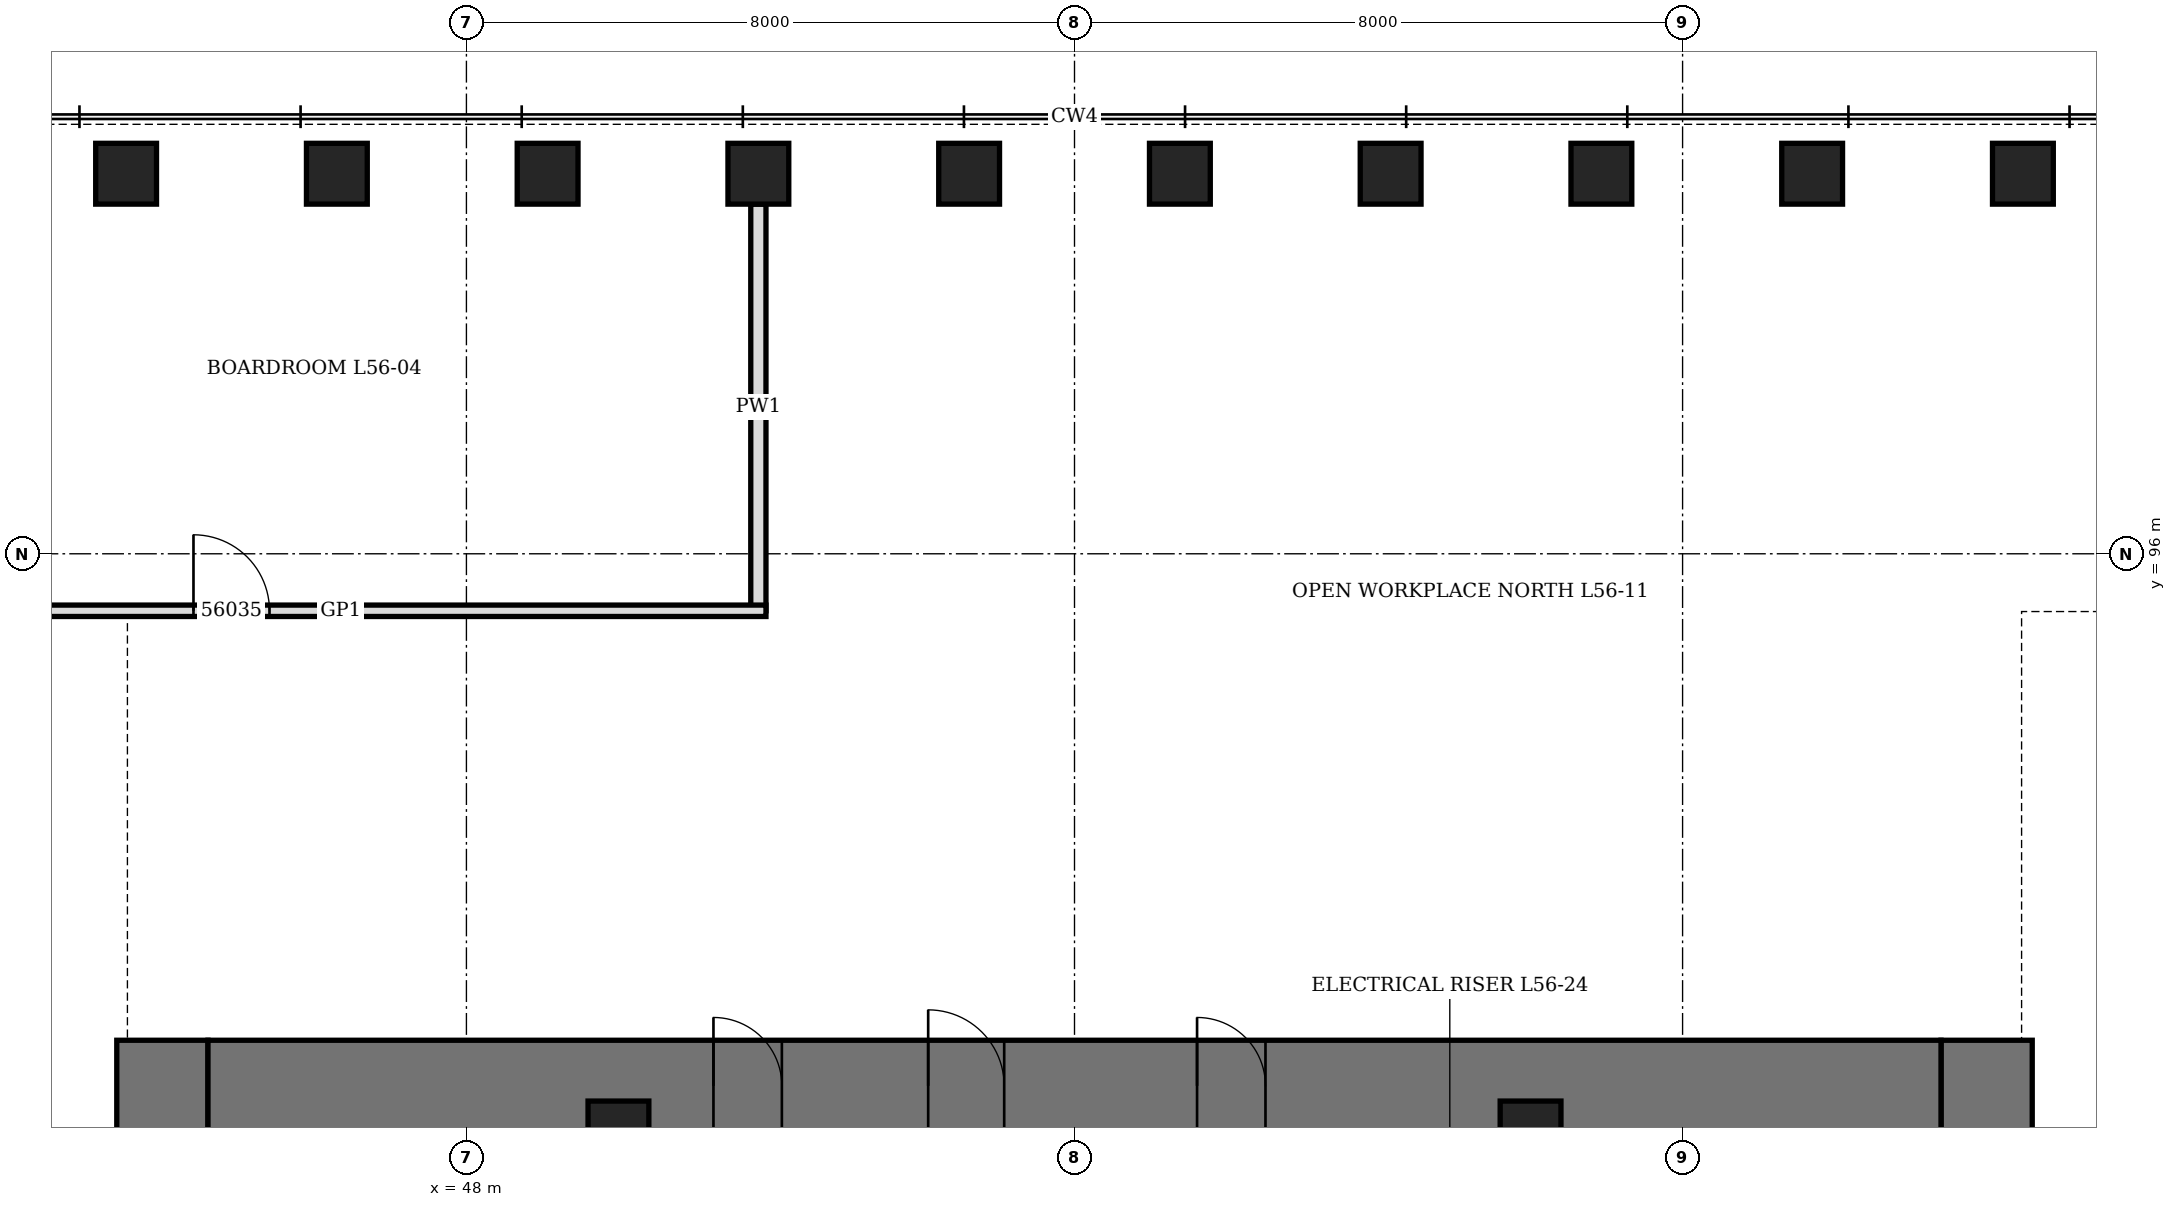
"""IFC4 building model, lengths in metres.
Left out: names, types, materials, properties, quantities, classifications, styles, units other than length and angle.
Written with IfcOpenShell. Run it as: python <this file> out.ifc"""

import sys

from ifc_helpers import new_model, si_unit, direction, frame, frame_2d, origin, origin_2d, place, context, subcontext, project, spatial, rectangle, hollow_rectangle, extrude, element, fill, save


model = new_model("IFC4")
c1 = context("Model", 3, precision=1e-05, world=origin(), true_north=direction((0.0, 1.0)))
c2 = subcontext(c1, "Body", "Model", "MODEL_VIEW")
j1 = project(units=[si_unit("LENGTHUNIT", "METRE"), si_unit("PLANEANGLEUNIT", "RADIAN")], contexts=[c1])
p1 = place(None, origin())
s1 = spatial("IfcSite", under=j1, at=p1, CompositionType="ELEMENT")
p2 = place(p1, origin())
s2 = spatial("IfcBuilding", under=s1, at=p2, CompositionType="ELEMENT")
p3 = place(p2, frame((0.0, 0.0, 250.3)))
s3 = spatial("IfcBuildingStorey", under=s2, at=p3, CompositionType="ELEMENT", Elevation=250.3)
for number, where, z_axis, x_axis in (
    (1, (68.477, 101.0, -0.16), (0.0, 0.0, 1.0), (1.0, 0.0, 0.0)),
    (2, (65.705, 101.0, -0.16), (0.0, 0.0, 1.0), (1.0, 0.0, 0.0)),
    (3, (62.932, 101.0, -0.16), (0.0, 0.0, 1.0), (1.0, 0.0, 0.0)),
    (4, (60.159, 101.0, -0.16), (0.0, 0.0, 1.0), (1.0, 0.0, 0.0)),
    (5, (57.386, 101.0, -0.16), (0.0, 0.0, 1.0), (1.0, 0.0, 0.0)),
    (6, (54.614, 101.0, -0.16), (0.0, 0.0, 1.0), (1.0, 0.0, 0.0)),
    (7, (51.841, 101.0, -0.16), (0.0, 0.0, 1.0), (1.0, 0.0, 0.0)),
    (8, (49.068, 101.0, -0.16), (0.0, 0.0, 1.0), (1.0, 0.0, 0.0)),
    (9, (46.295, 101.0, -0.16), (0.0, 0.0, 1.0), (1.0, 0.0, 0.0)),
    (10, (43.523, 101.0, -0.16), (0.0, 0.0, 1.0), (1.0, 0.0, 0.0)),
):
    element("IfcColumn", number, at=place(p3, frame(where, z_axis=z_axis, x_axis=x_axis)), inside=s3, PredefinedType="COLUMN", context=c2, shape_type="SweptSolid", body=[
        extrude(hollow_rectangle(XDim=0.8, YDim=0.8, WallThickness=0.1, at=origin_2d()), origin(), (0.0, 0.0, 1.0), 4.36),
    ])
p4 = place(p3, frame((44.0, 70.4, 0.0), z_axis=(0.0, 0.0, 1.0), x_axis=(0.0, 1.0, 0.0)))
e11 = element("IfcWall", 11, at=p4, inside=s3, PredefinedType="SHEAR", context=c2, shape_type="SweptSolid", body=[
    extrude(rectangle(XDim=19.2, YDim=1.2, at=frame_2d((9.6, 0.0))), origin(), (0.0, 0.0, 1.0), 4.2),
])
p5 = place(p4, frame((8.6, 0.0, 0.0)))
e12 = element("IfcOpeningElement", 12, at=p5, cuts=e11, PredefinedType="OPENING", context=c2, shape_type="SweptSolid", body=[
    extrude(rectangle(XDim=2.0, YDim=2.4, at=frame_2d((1.0, 1.2))), frame((0.0, 0.61, 0.0), z_axis=(0.0, -1.0, 0.0), x_axis=(1.0, 0.0, 0.0)), (0.0, 0.0, 1.0), 1.22),
])
p6 = place(p3, frame((68.0, 70.4, 0.0), z_axis=(0.0, 0.0, 1.0), x_axis=(0.0, 1.0, 0.0)))
e13 = element("IfcWall", 13, at=p6, inside=s3, PredefinedType="SHEAR", context=c2, shape_type="SweptSolid", body=[
    extrude(rectangle(XDim=19.2, YDim=1.2, at=frame_2d((9.6, 0.0))), origin(), (0.0, 0.0, 1.0), 4.2),
])
p7 = place(p6, frame((8.6, 0.0, 0.0)))
e14 = element("IfcOpeningElement", 14, at=p7, cuts=e13, PredefinedType="OPENING", context=c2, shape_type="SweptSolid", body=[
    extrude(rectangle(XDim=2.0, YDim=2.4, at=frame_2d((1.0, 1.2))), frame((0.0, 0.61, 0.0), z_axis=(0.0, -1.0, 0.0), x_axis=(1.0, 0.0, 0.0)), (0.0, 0.0, 1.0), 1.22),
])
p8 = place(p3, frame((44.6, 89.0, 0.0), z_axis=(0.0, 0.0, 1.0), x_axis=(1.0, 0.0, 0.0)))
e15 = element("IfcWall", 15, at=p8, inside=s3, PredefinedType="SHEAR", context=c2, shape_type="SweptSolid", body=[
    extrude(rectangle(XDim=22.8, YDim=1.2, at=frame_2d((11.4, 0.0))), origin(), (0.0, 0.0, 1.0), 4.2),
])
p9 = place(p8, frame((9.475, 0.0, 0.0)))
e16 = element("IfcOpeningElement", 16, at=p9, cuts=e15, PredefinedType="OPENING", context=c2, shape_type="SweptSolid", body=[
    extrude(rectangle(XDim=1.0, YDim=2.1, at=frame_2d((0.5, 1.05))), frame((0.0, 0.61, 0.0), z_axis=(0.0, -1.0, 0.0), x_axis=(1.0, 0.0, 0.0)), (0.0, 0.0, 1.0), 1.22),
])
p10 = place(p8, frame((6.65, 0.0, 0.0)))
e17 = element("IfcOpeningElement", 17, at=p10, cuts=e15, PredefinedType="OPENING", context=c2, shape_type="SweptSolid", body=[
    extrude(rectangle(XDim=0.9, YDim=2.1, at=frame_2d((0.45, 1.05))), frame((0.0, 0.61, 0.0), z_axis=(0.0, -1.0, 0.0), x_axis=(1.0, 0.0, 0.0)), (0.0, 0.0, 1.0), 1.22),
])
p11 = place(p8, frame((13.012, 0.0, 0.0)))
e18 = element("IfcOpeningElement", 18, at=p11, cuts=e15, PredefinedType="OPENING", context=c2, shape_type="SweptSolid", body=[
    extrude(rectangle(XDim=0.9, YDim=2.1, at=frame_2d((0.45, 1.05))), frame((0.0, 0.61, 0.0), z_axis=(0.0, -1.0, 0.0), x_axis=(1.0, 0.0, 0.0)), (0.0, 0.0, 1.0), 1.22),
])
for number, where, z_axis, x_axis in (
    (19, (50.0, 88.4, 0.0), (0.0, 0.0, 1.0), (1.0, 0.0, 0.0)),
    (20, (62.0, 88.4, 0.0), (0.0, 0.0, 1.0), (1.0, 0.0, 0.0)),
):
    element("IfcColumn", number, at=place(p3, frame(where, z_axis=z_axis, x_axis=x_axis)), inside=s3, PredefinedType="COLUMN", context=c2, shape_type="SweptSolid", body=[
        extrude(hollow_rectangle(XDim=0.8, YDim=0.8, WallThickness=0.1, at=origin_2d()), origin(), (0.0, 0.0, 1.0), 4.2),
    ])
p12 = place(p3, frame((51.841, 95.25, 0.0), z_axis=(0.0, 0.0, 1.0), x_axis=(0.0, 1.0, 0.0)))
e21 = element("IfcWall", 21, at=p12, inside=s3, PredefinedType="PARTITIONING", context=c2, shape_type="SweptSolid", body=[
    extrude(rectangle(XDim=5.35, YDim=0.2, at=frame_2d((2.675, 0.0))), origin(), (0.0, 0.0, 1.0), 3.428),
])
p13 = place(p3, frame((40.75, 95.25, 0.0), z_axis=(0.0, 0.0, 1.0), x_axis=(1.0, 0.0, 0.0)))
e22 = element("IfcWall", 22, at=p13, inside=s3, PredefinedType="PARTITIONING", context=c2, shape_type="SweptSolid", body=[
    extrude(rectangle(XDim=11.191, YDim=0.15, at=frame_2d((5.595, 0.0))), origin(), (0.0, 0.0, 1.0), 4.04),
])
p14 = place(p13, frame((3.659, 0.0, 0.0)))
e23 = element("IfcOpeningElement", 23, at=p14, cuts=e22, PredefinedType="OPENING", context=c2, shape_type="SweptSolid", body=[
    extrude(rectangle(XDim=1.0, YDim=2.4, at=frame_2d((0.5, 1.2))), frame((0.0, 0.085, 0.0), z_axis=(0.0, -1.0, 0.0), x_axis=(1.0, 0.0, 0.0)), (0.0, 0.0, 1.0), 0.17),
])
p15 = place(p9, origin())
e24 = element("IfcDoor", 24, at=p15, inside=s3, OperationType="SINGLE_SWING_LEFT", PredefinedType="DOOR", context=c2, shape_type="SweptSolid", body=[
    extrude(rectangle(XDim=1.0, YDim=2.1, at=frame_2d((0.5, 1.05))), frame((0.0, 0.35, 0.0), z_axis=(0.0, -1.0, 0.0), x_axis=(1.0, 0.0, 0.0)), (0.0, 0.0, 1.0), 0.7),
])
fill(e16, e24)
p16 = place(p10, origin())
e25 = element("IfcDoor", 25, at=p16, inside=s3, OperationType="SINGLE_SWING_LEFT", PredefinedType="DOOR", context=c2, shape_type="SweptSolid", body=[
    extrude(rectangle(XDim=0.9, YDim=2.1, at=frame_2d((0.45, 1.05))), frame((0.0, 0.35, 0.0), z_axis=(0.0, -1.0, 0.0), x_axis=(1.0, 0.0, 0.0)), (0.0, 0.0, 1.0), 0.7),
])
fill(e17, e25)
p17 = place(p11, origin())
e26 = element("IfcDoor", 26, at=p17, inside=s3, OperationType="SINGLE_SWING_LEFT", PredefinedType="DOOR", context=c2, shape_type="SweptSolid", body=[
    extrude(rectangle(XDim=0.9, YDim=2.1, at=frame_2d((0.45, 1.05))), frame((0.0, 0.35, 0.0), z_axis=(0.0, -1.0, 0.0), x_axis=(1.0, 0.0, 0.0)), (0.0, 0.0, 1.0), 0.7),
])
fill(e18, e26)
p18 = place(p14, origin())
e27 = element("IfcDoor", 27, at=p18, inside=s3, OperationType="SINGLE_SWING_RIGHT", PredefinedType="DOOR", context=c2, shape_type="SweptSolid", body=[
    extrude(rectangle(XDim=1.0, YDim=2.4, at=frame_2d((0.5, 1.2))), frame((0.0, 0.075, 0.0), z_axis=(0.0, -1.0, 0.0), x_axis=(1.0, 0.0, 0.0)), (0.0, 0.0, 1.0), 0.149),
])
fill(e23, e27)
save(model, sys.argv[1])
